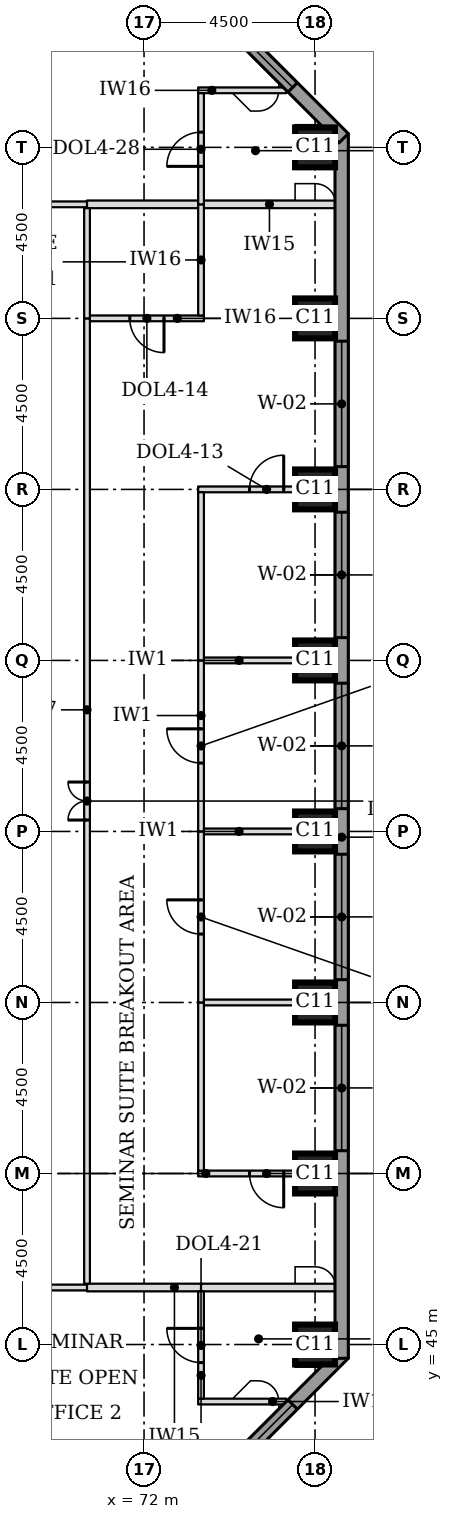
"""IFC4 building model, lengths in metres.
Left out: names, types, materials, properties, quantities, classifications, styles, units other than length and angle.
Written with IfcOpenShell. Run it as: python <this file> out.ifc"""

import sys

from ifc_helpers import new_model, si_unit, direction, frame, frame_2d, origin, origin_2d, place, context, subcontext, project, spatial, rectangle, extrude, element, fill, save


model = new_model("IFC4")
c1 = context("Model", 3, precision=1e-05, world=origin(), true_north=direction((0.0, 1.0)))
c2 = subcontext(c1, "Body", "Model", "MODEL_VIEW")
j1 = project(units=[si_unit("LENGTHUNIT", "METRE"), si_unit("PLANEANGLEUNIT", "RADIAN")], contexts=[c1])
p1 = place(None, origin())
s1 = spatial("IfcSite", under=j1, at=p1, CompositionType="ELEMENT")
p2 = place(p1, origin())
s2 = spatial("IfcBuilding", under=s1, at=p2, CompositionType="ELEMENT")
p3 = place(p2, frame((0.0, 0.0, 101.1)))
s3 = spatial("IfcBuildingStorey", under=s2, at=p3, CompositionType="ELEMENT", Elevation=101.1)
for number, where, z_axis, x_axis in (
    (1, (76.5, 45.0, 0.0), (0.0, 0.0, 1.0), (1.0, 0.0, 0.0)),
    (2, (76.5, 49.5, 0.0), (0.0, 0.0, 1.0), (1.0, 0.0, 0.0)),
    (3, (76.5, 54.0, 0.0), (0.0, 0.0, 1.0), (1.0, 0.0, 0.0)),
    (4, (76.5, 58.5, 0.0), (0.0, 0.0, 1.0), (1.0, 0.0, 0.0)),
    (5, (76.5, 63.0, 0.0), (0.0, 0.0, 1.0), (1.0, 0.0, 0.0)),
    (6, (76.5, 67.5, 0.0), (0.0, 0.0, 1.0), (1.0, 0.0, 0.0)),
    (7, (76.5, 72.0, 0.0), (0.0, 0.0, 1.0), (1.0, 0.0, 0.0)),
    (8, (76.5, 76.5, 0.0), (0.0, 0.0, 1.0), (1.0, 0.0, 0.0)),
):
    element("IfcColumn", number, at=place(p3, frame(where, z_axis=z_axis, x_axis=x_axis)), inside=s3, PredefinedType="COLUMN", context=c2, shape_type="SweptSolid", body=[
        extrude(rectangle(XDim=1.05, YDim=1.05, at=origin_2d()), origin(), (0.0, 0.0, 1.0), 3.7),
    ])
p4 = place(p3, frame((72.239, 39.749, 0.0), z_axis=(0.0, 0.0, 1.0), x_axis=(0.707106781187, 0.707106781187, 0.0)))
e9 = element("IfcWall", 9, at=p4, inside=s3, PredefinedType="STANDARD", context=c2, shape_type="SweptSolid", body=[
    extrude(rectangle(XDim=7.089, YDim=0.35, at=frame_2d((3.544, 0.0))), origin(), (0.0, 0.0, 1.0), 3.525),
])
p5 = place(p4, frame((1.894, 0.0, 0.9)))
e10 = element("IfcOpeningElement", 10, at=p5, cuts=e9, PredefinedType="OPENING", context=c2, shape_type="SweptSolid", body=[
    extrude(rectangle(XDim=3.3, YDim=1.9, at=frame_2d((1.65, 0.95))), frame((0.0, 0.185, 0.0), z_axis=(0.0, -1.0, 0.0), x_axis=(1.0, 0.0, 0.0)), (0.0, 0.0, 1.0), 0.37),
])
p6 = place(p3, frame((77.2, 44.638, 0.0), z_axis=(0.0, 0.0, 1.0), x_axis=(0.0, 1.0, 0.0)))
e11 = element("IfcWall", 11, at=p6, inside=s3, PredefinedType="STANDARD", context=c2, shape_type="SweptSolid", body=[
    extrude(rectangle(XDim=32.225, YDim=0.35, at=frame_2d((16.112, 0.0))), origin(), (0.0, 0.0, 1.0), 3.525),
])
p7 = place(p6, frame((5.462, 0.0, 0.9)))
e12 = element("IfcOpeningElement", 12, at=p7, cuts=e11, PredefinedType="OPENING", context=c2, shape_type="SweptSolid", body=[
    extrude(rectangle(XDim=3.3, YDim=1.9, at=frame_2d((1.65, 0.95))), frame((0.0, 0.185, 0.0), z_axis=(0.0, -1.0, 0.0), x_axis=(1.0, 0.0, 0.0)), (0.0, 0.0, 1.0), 0.37),
])
p8 = place(p6, frame((9.962, 0.0, 0.9)))
e13 = element("IfcOpeningElement", 13, at=p8, cuts=e11, PredefinedType="OPENING", context=c2, shape_type="SweptSolid", body=[
    extrude(rectangle(XDim=3.3, YDim=1.9, at=frame_2d((1.65, 0.95))), frame((0.0, 0.185, 0.0), z_axis=(0.0, -1.0, 0.0), x_axis=(1.0, 0.0, 0.0)), (0.0, 0.0, 1.0), 0.37),
])
p9 = place(p6, frame((14.462, 0.0, 0.9)))
e14 = element("IfcOpeningElement", 14, at=p9, cuts=e11, PredefinedType="OPENING", context=c2, shape_type="SweptSolid", body=[
    extrude(rectangle(XDim=3.3, YDim=1.9, at=frame_2d((1.65, 0.95))), frame((0.0, 0.185, 0.0), z_axis=(0.0, -1.0, 0.0), x_axis=(1.0, 0.0, 0.0)), (0.0, 0.0, 1.0), 0.37),
])
p10 = place(p6, frame((18.962, 0.0, 0.9)))
e15 = element("IfcOpeningElement", 15, at=p10, cuts=e11, PredefinedType="OPENING", context=c2, shape_type="SweptSolid", body=[
    extrude(rectangle(XDim=3.3, YDim=1.9, at=frame_2d((1.65, 0.95))), frame((0.0, 0.185, 0.0), z_axis=(0.0, -1.0, 0.0), x_axis=(1.0, 0.0, 0.0)), (0.0, 0.0, 1.0), 0.37),
])
p11 = place(p6, frame((23.462, 0.0, 0.9)))
e16 = element("IfcOpeningElement", 16, at=p11, cuts=e11, PredefinedType="OPENING", context=c2, shape_type="SweptSolid", body=[
    extrude(rectangle(XDim=3.3, YDim=1.9, at=frame_2d((1.65, 0.95))), frame((0.0, 0.185, 0.0), z_axis=(0.0, -1.0, 0.0), x_axis=(1.0, 0.0, 0.0)), (0.0, 0.0, 1.0), 0.37),
])
p12 = place(p3, frame((77.251, 76.739, 0.0), z_axis=(0.0, 0.0, 1.0), x_axis=(-0.707106781187, 0.707106781187, 0.0)))
e17 = element("IfcWall", 17, at=p12, inside=s3, PredefinedType="STANDARD", context=c2, shape_type="SweptSolid", body=[
    extrude(rectangle(XDim=7.089, YDim=0.35, at=frame_2d((3.544, 0.0))), origin(), (0.0, 0.0, 1.0), 3.525),
])
p13 = place(p12, frame((1.894, 0.0, 0.9)))
e18 = element("IfcOpeningElement", 18, at=p13, cuts=e17, PredefinedType="OPENING", context=c2, shape_type="SweptSolid", body=[
    extrude(rectangle(XDim=3.3, YDim=1.9, at=frame_2d((1.65, 0.95))), frame((0.0, 0.185, 0.0), z_axis=(0.0, -1.0, 0.0), x_axis=(1.0, 0.0, 0.0)), (0.0, 0.0, 1.0), 0.37),
])
p14 = place(p3, frame((73.425, 43.5, 0.0), z_axis=(0.0, 0.0, 1.0), x_axis=(1.0, 0.0, 0.0)))
e19 = element("IfcWall", 19, at=p14, inside=s3, PredefinedType="PARTITIONING", context=c2, shape_type="SweptSolid", body=[
    extrude(rectangle(XDim=2.317, YDim=0.15, at=frame_2d((1.159, 0.0))), origin(), (0.0, 0.0, 1.0), 3.55),
])
p15 = place(p3, frame((54.0, 46.5, 0.0), z_axis=(0.0, 0.0, 1.0), x_axis=(1.0, 0.0, 0.0)))
e20 = element("IfcWall", 20, at=p15, inside=s3, PredefinedType="PARTITIONING", context=c2, shape_type="SweptSolid", body=[
    extrude(rectangle(XDim=16.5, YDim=0.15, at=frame_2d((8.25, 0.0))), origin(), (0.0, 0.0, 1.0), 3.55),
])
p16 = place(p3, frame((70.5, 46.5, 0.0), z_axis=(0.0, 0.0, 1.0), x_axis=(1.0, 0.0, 0.0)))
e21 = element("IfcWall", 21, at=p16, inside=s3, PredefinedType="PARTITIONING", context=c2, shape_type="SweptSolid", body=[
    extrude(rectangle(XDim=3.0, YDim=0.2, at=frame_2d((1.5, 0.0))), origin(), (0.0, 0.0, 1.0), 3.55),
])
p17 = place(p3, frame((73.5, 46.5, 0.0), z_axis=(0.0, 0.0, 1.0), x_axis=(1.0, 0.0, 0.0)))
e22 = element("IfcWall", 22, at=p17, inside=s3, PredefinedType="PARTITIONING", context=c2, shape_type="SweptSolid", body=[
    extrude(rectangle(XDim=3.525, YDim=0.2, at=frame_2d((1.762, 0.0))), origin(), (0.0, 0.0, 1.0), 3.55),
])
p18 = place(p3, frame((73.425, 49.5, 0.0), z_axis=(0.0, 0.0, 1.0), x_axis=(1.0, 0.0, 0.0)))
e23 = element("IfcWall", 23, at=p18, inside=s3, PredefinedType="PARTITIONING", context=c2, shape_type="SweptSolid", body=[
    extrude(rectangle(XDim=3.6, YDim=0.15, at=frame_2d((1.8, 0.0))), origin(), (0.0, 0.0, 1.0), 3.55),
])
p19 = place(p18, frame((1.35, 0.0, 0.0)))
e24 = element("IfcOpeningElement", 24, at=p19, cuts=e23, PredefinedType="OPENING", context=c2, shape_type="SweptSolid", body=[
    extrude(rectangle(XDim=0.9, YDim=2.1, at=frame_2d((0.45, 1.05))), frame((0.0, 0.085, 0.0), z_axis=(0.0, -1.0, 0.0), x_axis=(1.0, 0.0, 0.0)), (0.0, 0.0, 1.0), 0.17),
])
for number, where, z_axis, x_axis in (
    (25, (73.575, 54.0, 0.0), (0.0, 0.0, 1.0), (1.0, 0.0, 0.0)),
    (26, (73.575, 58.5, 0.0), (0.0, 0.0, 1.0), (1.0, 0.0, 0.0)),
    (27, (73.575, 63.0, 0.0), (0.0, 0.0, 1.0), (1.0, 0.0, 0.0)),
):
    element("IfcWall", number, at=place(p3, frame(where, z_axis=z_axis, x_axis=x_axis)), inside=s3, PredefinedType="PARTITIONING", context=c2, shape_type="SweptSolid", body=[
        extrude(rectangle(XDim=3.45, YDim=0.15, at=frame_2d((1.725, 0.0))), origin(), (0.0, 0.0, 1.0), 3.55),
    ])
p20 = place(p3, frame((73.425, 67.5, 0.0), z_axis=(0.0, 0.0, 1.0), x_axis=(1.0, 0.0, 0.0)))
e28 = element("IfcWall", 28, at=p20, inside=s3, PredefinedType="PARTITIONING", context=c2, shape_type="SweptSolid", body=[
    extrude(rectangle(XDim=3.6, YDim=0.15, at=frame_2d((1.8, 0.0))), origin(), (0.0, 0.0, 1.0), 3.55),
])
p21 = place(p20, frame((1.35, 0.0, 0.0)))
e29 = element("IfcOpeningElement", 29, at=p21, cuts=e28, PredefinedType="OPENING", context=c2, shape_type="SweptSolid", body=[
    extrude(rectangle(XDim=0.9, YDim=2.1, at=frame_2d((0.45, 1.05))), frame((0.0, 0.085, 0.0), z_axis=(0.0, -1.0, 0.0), x_axis=(1.0, 0.0, 0.0)), (0.0, 0.0, 1.0), 0.17),
])
p22 = place(p3, frame((70.575, 72.0, 0.0), z_axis=(0.0, 0.0, 1.0), x_axis=(1.0, 0.0, 0.0)))
e30 = element("IfcWall", 30, at=p22, inside=s3, PredefinedType="PARTITIONING", context=c2, shape_type="SweptSolid", body=[
    extrude(rectangle(XDim=3.0, YDim=0.15, at=frame_2d((1.5, 0.0))), origin(), (0.0, 0.0, 1.0), 3.55),
])
p23 = place(p22, frame((1.05, 0.0, 0.0)))
e31 = element("IfcOpeningElement", 31, at=p23, cuts=e30, PredefinedType="OPENING", context=c2, shape_type="SweptSolid", body=[
    extrude(rectangle(XDim=0.9, YDim=2.1, at=frame_2d((0.45, 1.05))), frame((0.0, 0.085, 0.0), z_axis=(0.0, -1.0, 0.0), x_axis=(1.0, 0.0, 0.0)), (0.0, 0.0, 1.0), 0.17),
])
p24 = place(p3, frame((46.5, 75.0, 0.0), z_axis=(0.0, 0.0, 1.0), x_axis=(1.0, 0.0, 0.0)))
e32 = element("IfcWall", 32, at=p24, inside=s3, PredefinedType="PARTITIONING", context=c2, shape_type="SweptSolid", body=[
    extrude(rectangle(XDim=24.0, YDim=0.15, at=frame_2d((12.0, 0.0))), origin(), (0.0, 0.0, 1.0), 3.55),
])
p25 = place(p3, frame((70.5, 75.0, 0.0), z_axis=(0.0, 0.0, 1.0), x_axis=(1.0, 0.0, 0.0)))
e33 = element("IfcWall", 33, at=p25, inside=s3, PredefinedType="PARTITIONING", context=c2, shape_type="SweptSolid", body=[
    extrude(rectangle(XDim=2.925, YDim=0.2, at=frame_2d((1.462, 0.0))), origin(), (0.0, 0.0, 1.0), 3.55),
])
p26 = place(p3, frame((73.575, 75.0, 0.0), z_axis=(0.0, 0.0, 1.0), x_axis=(1.0, 0.0, 0.0)))
e34 = element("IfcWall", 34, at=p26, inside=s3, PredefinedType="PARTITIONING", context=c2, shape_type="SweptSolid", body=[
    extrude(rectangle(XDim=3.45, YDim=0.2, at=frame_2d((1.725, 0.0))), origin(), (0.0, 0.0, 1.0), 3.55),
])
p27 = place(p3, frame((73.425, 78.0, 0.0), z_axis=(0.0, 0.0, 1.0), x_axis=(1.0, 0.0, 0.0)))
e35 = element("IfcWall", 35, at=p27, inside=s3, PredefinedType="PARTITIONING", context=c2, shape_type="SweptSolid", body=[
    extrude(rectangle(XDim=2.317, YDim=0.15, at=frame_2d((1.159, 0.0))), origin(), (0.0, 0.0, 1.0), 3.55),
])
p28 = place(p3, frame((73.5, 43.575, 0.0), z_axis=(0.0, 0.0, 1.0), x_axis=(0.0, 1.0, 0.0)))
e36 = element("IfcWall", 36, at=p28, inside=s3, PredefinedType="PARTITIONING", context=c2, shape_type="SweptSolid", body=[
    extrude(rectangle(XDim=2.825, YDim=0.15, at=frame_2d((1.413, 0.0))), origin(), (0.0, 0.0, 1.0), 3.55),
])
p29 = place(p28, frame((0.95, 0.0, 0.0)))
e37 = element("IfcOpeningElement", 37, at=p29, cuts=e36, PredefinedType="OPENING", context=c2, shape_type="SweptSolid", body=[
    extrude(rectangle(XDim=0.9, YDim=2.1, at=frame_2d((0.45, 1.05))), frame((0.0, 0.085, 0.0), z_axis=(0.0, -1.0, 0.0), x_axis=(1.0, 0.0, 0.0)), (0.0, 0.0, 1.0), 0.17),
])
p30 = place(p3, frame((70.5, 46.6, 0.0), z_axis=(0.0, 0.0, 1.0), x_axis=(0.0, 1.0, 0.0)))
e38 = element("IfcWall", 38, at=p30, inside=s3, PredefinedType="PARTITIONING", context=c2, shape_type="SweptSolid", body=[
    extrude(rectangle(XDim=25.4, YDim=0.15, at=frame_2d((12.7, 0.0))), origin(), (0.0, 0.0, 1.0), 3.55),
])
p31 = place(p30, frame((12.2, 0.0, 0.0)))
e39 = element("IfcOpeningElement", 39, at=p31, cuts=e38, PredefinedType="OPENING", context=c2, shape_type="SweptSolid", body=[
    extrude(rectangle(XDim=1.0, YDim=2.1, at=frame_2d((0.5, 1.05))), frame((0.0, 0.085, 0.0), z_axis=(0.0, -1.0, 0.0), x_axis=(1.0, 0.0, 0.0)), (0.0, 0.0, 1.0), 0.17),
])
p32 = place(p3, frame((73.5, 49.575, 0.0), z_axis=(0.0, 0.0, 1.0), x_axis=(0.0, 1.0, 0.0)))
e40 = element("IfcWall", 40, at=p32, inside=s3, PredefinedType="PARTITIONING", context=c2, shape_type="SweptSolid", body=[
    extrude(rectangle(XDim=4.425, YDim=0.15, at=frame_2d((2.212, 0.0))), origin(), (0.0, 0.0, 1.0), 3.55),
])
p33 = place(p3, frame((73.5, 54.0, 0.0), z_axis=(0.0, 0.0, 1.0), x_axis=(0.0, 1.0, 0.0)))
e41 = element("IfcWall", 41, at=p33, inside=s3, PredefinedType="PARTITIONING", context=c2, shape_type="SweptSolid", body=[
    extrude(rectangle(XDim=4.5, YDim=0.15, at=frame_2d((2.25, 0.0))), origin(), (0.0, 0.0, 1.0), 3.55),
])
p34 = place(p33, frame((1.8, 0.0, 0.0)))
e42 = element("IfcOpeningElement", 42, at=p34, cuts=e41, PredefinedType="OPENING", context=c2, shape_type="SweptSolid", body=[
    extrude(rectangle(XDim=0.9, YDim=2.1, at=frame_2d((0.45, 1.05))), frame((0.0, 0.085, 0.0), z_axis=(0.0, -1.0, 0.0), x_axis=(1.0, 0.0, 0.0)), (0.0, 0.0, 1.0), 0.17),
])
p35 = place(p3, frame((73.5, 58.5, 0.0), z_axis=(0.0, 0.0, 1.0), x_axis=(0.0, 1.0, 0.0)))
e43 = element("IfcWall", 43, at=p35, inside=s3, PredefinedType="PARTITIONING", context=c2, shape_type="SweptSolid", body=[
    extrude(rectangle(XDim=4.5, YDim=0.15, at=frame_2d((2.25, 0.0))), origin(), (0.0, 0.0, 1.0), 3.55),
])
p36 = place(p35, frame((1.8, 0.0, 0.0)))
e44 = element("IfcOpeningElement", 44, at=p36, cuts=e43, PredefinedType="OPENING", context=c2, shape_type="SweptSolid", body=[
    extrude(rectangle(XDim=0.9, YDim=2.1, at=frame_2d((0.45, 1.05))), frame((0.0, 0.085, 0.0), z_axis=(0.0, -1.0, 0.0), x_axis=(1.0, 0.0, 0.0)), (0.0, 0.0, 1.0), 0.17),
])
p37 = place(p3, frame((73.5, 63.0, 0.0), z_axis=(0.0, 0.0, 1.0), x_axis=(0.0, 1.0, 0.0)))
e45 = element("IfcWall", 45, at=p37, inside=s3, PredefinedType="PARTITIONING", context=c2, shape_type="SweptSolid", body=[
    extrude(rectangle(XDim=4.425, YDim=0.15, at=frame_2d((2.212, 0.0))), origin(), (0.0, 0.0, 1.0), 3.55),
])
p38 = place(p3, frame((70.5, 72.0, 0.0), z_axis=(0.0, 0.0, 1.0), x_axis=(0.0, 1.0, 0.0)))
e46 = element("IfcWall", 46, at=p38, inside=s3, PredefinedType="PARTITIONING", context=c2, shape_type="SweptSolid", body=[
    extrude(rectangle(XDim=2.9, YDim=0.15, at=frame_2d((1.45, 0.0))), origin(), (0.0, 0.0, 1.0), 3.55),
])
p39 = place(p3, frame((73.5, 72.075, 0.0), z_axis=(0.0, 0.0, 1.0), x_axis=(0.0, 1.0, 0.0)))
e47 = element("IfcWall", 47, at=p39, inside=s3, PredefinedType="PARTITIONING", context=c2, shape_type="SweptSolid", body=[
    extrude(rectangle(XDim=2.925, YDim=0.15, at=frame_2d((1.462, 0.0))), origin(), (0.0, 0.0, 1.0), 3.55),
])
p40 = place(p3, frame((73.5, 75.0, 0.0), z_axis=(0.0, 0.0, 1.0), x_axis=(0.0, 1.0, 0.0)))
e48 = element("IfcWall", 48, at=p40, inside=s3, PredefinedType="PARTITIONING", context=c2, shape_type="SweptSolid", body=[
    extrude(rectangle(XDim=2.925, YDim=0.15, at=frame_2d((1.462, 0.0))), origin(), (0.0, 0.0, 1.0), 3.55),
])
p41 = place(p40, frame((1.0, 0.0, 0.0)))
e49 = element("IfcOpeningElement", 49, at=p41, cuts=e48, PredefinedType="OPENING", context=c2, shape_type="SweptSolid", body=[
    extrude(rectangle(XDim=0.9, YDim=2.1, at=frame_2d((0.45, 1.05))), frame((0.0, 0.085, 0.0), z_axis=(0.0, -1.0, 0.0), x_axis=(1.0, 0.0, 0.0)), (0.0, 0.0, 1.0), 0.17),
])
p42 = place(p5, origin())
e50 = element("IfcWindow", 50, at=p42, inside=s3, PartitioningType="SINGLE_PANEL", PredefinedType="WINDOW", context=c2, shape_type="SweptSolid", body=[
    extrude(rectangle(XDim=3.3, YDim=1.9, at=frame_2d((1.65, 0.95))), frame((0.0, 0.085, 0.0), z_axis=(0.0, -1.0, 0.0), x_axis=(1.0, 0.0, 0.0)), (0.0, 0.0, 1.0), 0.06),
])
fill(e10, e50)
p43 = place(p7, origin())
e51 = element("IfcWindow", 51, at=p43, inside=s3, PartitioningType="SINGLE_PANEL", PredefinedType="WINDOW", context=c2, shape_type="SweptSolid", body=[
    extrude(rectangle(XDim=3.3, YDim=1.9, at=frame_2d((1.65, 0.95))), frame((0.0, 0.085, 0.0), z_axis=(0.0, -1.0, 0.0), x_axis=(1.0, 0.0, 0.0)), (0.0, 0.0, 1.0), 0.06),
])
fill(e12, e51)
p44 = place(p8, origin())
e52 = element("IfcWindow", 52, at=p44, inside=s3, PartitioningType="SINGLE_PANEL", PredefinedType="WINDOW", context=c2, shape_type="SweptSolid", body=[
    extrude(rectangle(XDim=3.3, YDim=1.9, at=frame_2d((1.65, 0.95))), frame((0.0, 0.085, 0.0), z_axis=(0.0, -1.0, 0.0), x_axis=(1.0, 0.0, 0.0)), (0.0, 0.0, 1.0), 0.06),
])
fill(e13, e52)
p45 = place(p9, origin())
e53 = element("IfcWindow", 53, at=p45, inside=s3, PartitioningType="SINGLE_PANEL", PredefinedType="WINDOW", context=c2, shape_type="SweptSolid", body=[
    extrude(rectangle(XDim=3.3, YDim=1.9, at=frame_2d((1.65, 0.95))), frame((0.0, 0.085, 0.0), z_axis=(0.0, -1.0, 0.0), x_axis=(1.0, 0.0, 0.0)), (0.0, 0.0, 1.0), 0.06),
])
fill(e14, e53)
p46 = place(p10, origin())
e54 = element("IfcWindow", 54, at=p46, inside=s3, PartitioningType="SINGLE_PANEL", PredefinedType="WINDOW", context=c2, shape_type="SweptSolid", body=[
    extrude(rectangle(XDim=3.3, YDim=1.9, at=frame_2d((1.65, 0.95))), frame((0.0, 0.085, 0.0), z_axis=(0.0, -1.0, 0.0), x_axis=(1.0, 0.0, 0.0)), (0.0, 0.0, 1.0), 0.06),
])
fill(e15, e54)
p47 = place(p11, origin())
e55 = element("IfcWindow", 55, at=p47, inside=s3, PartitioningType="SINGLE_PANEL", PredefinedType="WINDOW", context=c2, shape_type="SweptSolid", body=[
    extrude(rectangle(XDim=3.3, YDim=1.9, at=frame_2d((1.65, 0.95))), frame((0.0, 0.085, 0.0), z_axis=(0.0, -1.0, 0.0), x_axis=(1.0, 0.0, 0.0)), (0.0, 0.0, 1.0), 0.06),
])
fill(e16, e55)
p48 = place(p13, origin())
e56 = element("IfcWindow", 56, at=p48, inside=s3, PartitioningType="SINGLE_PANEL", PredefinedType="WINDOW", context=c2, shape_type="SweptSolid", body=[
    extrude(rectangle(XDim=3.3, YDim=1.9, at=frame_2d((1.65, 0.95))), frame((0.0, 0.085, 0.0), z_axis=(0.0, -1.0, 0.0), x_axis=(1.0, 0.0, 0.0)), (0.0, 0.0, 1.0), 0.06),
])
fill(e18, e56)
p49 = place(p29, origin())
e57 = element("IfcDoor", 57, at=p49, inside=s3, OperationType="SINGLE_SWING_RIGHT", PredefinedType="DOOR", context=c2, shape_type="SweptSolid", body=[
    extrude(rectangle(XDim=0.9, YDim=2.1, at=frame_2d((0.45, 1.05))), frame((0.0, 0.025, 0.0), z_axis=(0.0, -1.0, 0.0), x_axis=(1.0, 0.0, 0.0)), (0.0, 0.0, 1.0), 0.05),
])
fill(e37, e57)
p50 = place(p31, origin())
e58 = element("IfcDoor", 58, at=p50, inside=s3, OperationType="DOUBLE_DOOR_SINGLE_SWING", PredefinedType="DOOR", context=c2, shape_type="SweptSolid", body=[
    extrude(rectangle(XDim=1.0, YDim=2.1, at=frame_2d((0.5, 1.05))), frame((0.0, 0.025, 0.0), z_axis=(0.0, -1.0, 0.0), x_axis=(1.0, 0.0, 0.0)), (0.0, 0.0, 1.0), 0.05),
])
fill(e39, e58)
p51 = place(p23, frame((0.9, 0.0, 0.0), z_axis=(0.0, 0.0, 1.0), x_axis=(-1.0, 0.0, 0.0)))
e59 = element("IfcDoor", 59, at=p51, inside=s3, OperationType="SINGLE_SWING_LEFT", PredefinedType="DOOR", context=c2, shape_type="SweptSolid", body=[
    extrude(rectangle(XDim=0.9, YDim=2.1, at=frame_2d((0.45, 1.05))), frame((0.0, 0.025, 0.0), z_axis=(0.0, -1.0, 0.0), x_axis=(1.0, 0.0, 0.0)), (0.0, 0.0, 1.0), 0.05),
])
fill(e31, e59)
p52 = place(p19, frame((0.9, 0.0, 0.0), z_axis=(0.0, 0.0, 1.0), x_axis=(-1.0, 0.0, 0.0)))
e60 = element("IfcDoor", 60, at=p52, inside=s3, OperationType="SINGLE_SWING_LEFT", PredefinedType="DOOR", context=c2, shape_type="SweptSolid", body=[
    extrude(rectangle(XDim=0.9, YDim=2.1, at=frame_2d((0.45, 1.05))), frame((0.0, 0.025, 0.0), z_axis=(0.0, -1.0, 0.0), x_axis=(1.0, 0.0, 0.0)), (0.0, 0.0, 1.0), 0.05),
])
fill(e24, e60)
p53 = place(p34, origin())
e61 = element("IfcDoor", 61, at=p53, inside=s3, OperationType="SINGLE_SWING_RIGHT", PredefinedType="DOOR", context=c2, shape_type="SweptSolid", body=[
    extrude(rectangle(XDim=0.9, YDim=2.1, at=frame_2d((0.45, 1.05))), frame((0.0, 0.025, 0.0), z_axis=(0.0, -1.0, 0.0), x_axis=(1.0, 0.0, 0.0)), (0.0, 0.0, 1.0), 0.05),
])
fill(e42, e61)
p54 = place(p36, origin())
e62 = element("IfcDoor", 62, at=p54, inside=s3, OperationType="SINGLE_SWING_RIGHT", PredefinedType="DOOR", context=c2, shape_type="SweptSolid", body=[
    extrude(rectangle(XDim=0.9, YDim=2.1, at=frame_2d((0.45, 1.05))), frame((0.0, 0.025, 0.0), z_axis=(0.0, -1.0, 0.0), x_axis=(1.0, 0.0, 0.0)), (0.0, 0.0, 1.0), 0.05),
])
fill(e44, e62)
p55 = place(p21, origin())
e63 = element("IfcDoor", 63, at=p55, inside=s3, OperationType="SINGLE_SWING_RIGHT", PredefinedType="DOOR", context=c2, shape_type="SweptSolid", body=[
    extrude(rectangle(XDim=0.9, YDim=2.1, at=frame_2d((0.45, 1.05))), frame((0.0, 0.025, 0.0), z_axis=(0.0, -1.0, 0.0), x_axis=(1.0, 0.0, 0.0)), (0.0, 0.0, 1.0), 0.05),
])
fill(e29, e63)
p56 = place(p41, origin())
e64 = element("IfcDoor", 64, at=p56, inside=s3, OperationType="SINGLE_SWING_LEFT", PredefinedType="DOOR", context=c2, shape_type="SweptSolid", body=[
    extrude(rectangle(XDim=0.9, YDim=2.1, at=frame_2d((0.45, 1.05))), frame((0.0, 0.025, 0.0), z_axis=(0.0, -1.0, 0.0), x_axis=(1.0, 0.0, 0.0)), (0.0, 0.0, 1.0), 0.05),
])
fill(e49, e64)
save(model, sys.argv[1])
